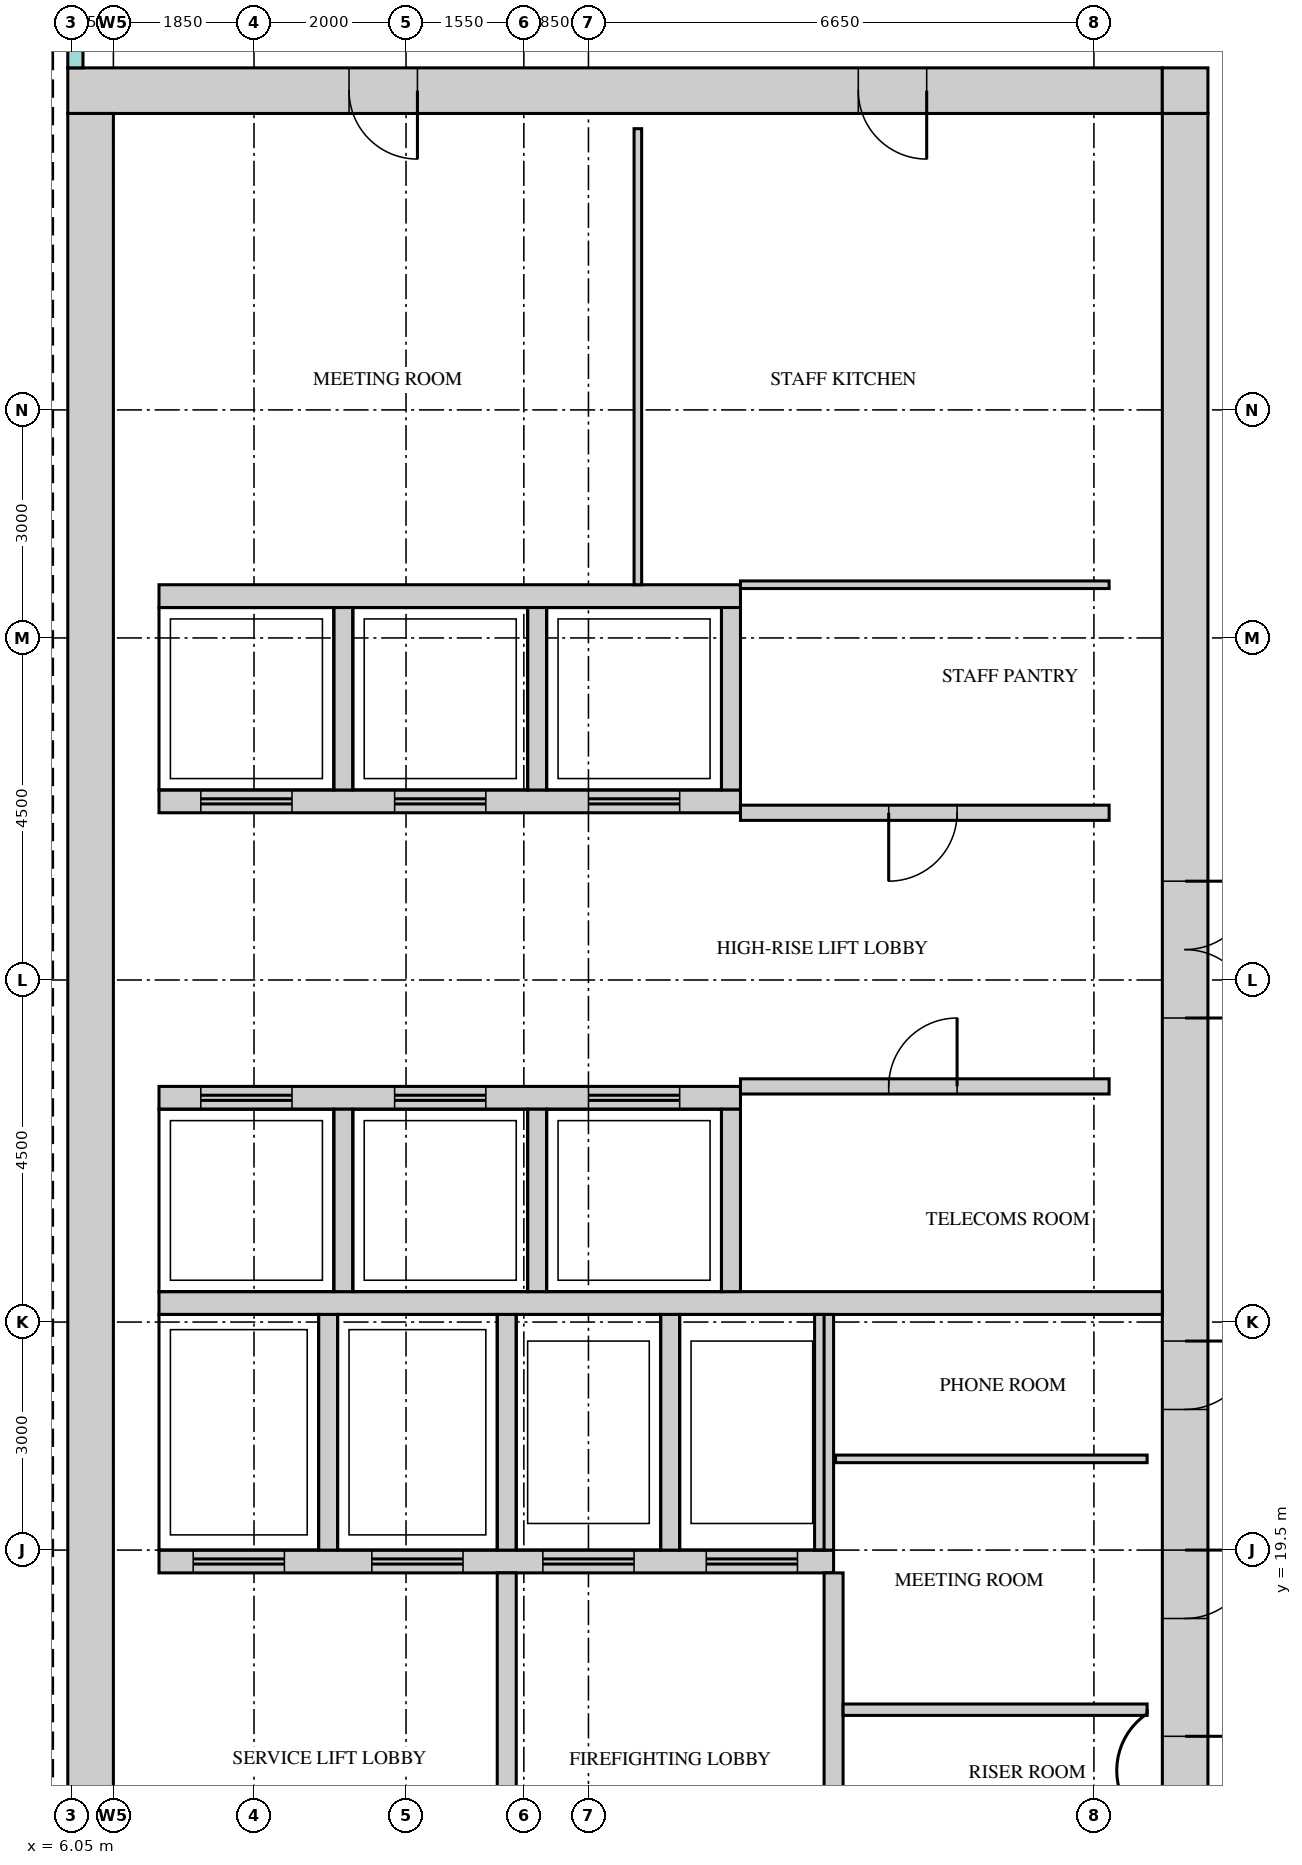
"""IFC4 building model, lengths in metres.
Left out: names, types, materials, properties, quantities, classifications, styles, units other than length and angle.
Written with IfcOpenShell. Run it as: python <this file> out.ifc"""

import sys

from ifc_helpers import new_model, si_unit, direction, frame, frame_2d, origin, place, context, subcontext, project, spatial, rectangle, extrude, source, transform, mapped, element, fill, save


model = new_model("IFC4")
c1 = context("Model", 3, precision=1e-05, world=origin(), true_north=direction((0.0, 1.0)))
c2 = subcontext(c1, "Body", "Model", "MODEL_VIEW")
j1 = project(units=[si_unit("LENGTHUNIT", "METRE"), si_unit("PLANEANGLEUNIT", "RADIAN")], contexts=[c1])
p1 = place(None, origin())
s1 = spatial("IfcSite", under=j1, at=p1, CompositionType="ELEMENT")
p2 = place(p1, origin())
s2 = spatial("IfcBuilding", under=s1, at=p2, CompositionType="ELEMENT")
p3 = place(p2, frame((0.0, 0.0, 310.2)))
s3 = spatial("IfcBuildingStorey", under=s2, at=p3, CompositionType="ELEMENT", Elevation=310.2)
m1 = source(origin(), c2, "Body", "SweptSolid", [
    extrude(rectangle(XDim=14.4, YDim=0.6, at=frame_2d((7.2, 0.0))), origin(), (0.0, 0.0, 1.0), 3.75),
])
p4 = place(p3, frame((6.0, 38.7, 0.0), z_axis=(0.0, 0.0, 1.0), x_axis=(1.0, 0.0, 0.0)))
e1 = element("IfcWall", 1, at=p4, inside=s3, PredefinedType="SHEAR", context=c2, shape_type="MappedRepresentation", body=[
    mapped(m1, transform((0.0, 0.0, 0.0))),
])
m2 = source(origin(), c2, "Body", "SweptSolid", [
    extrude(rectangle(XDim=0.9, YDim=2.1, at=frame_2d((0.45, 1.05))), frame((0.0, 0.31, 0.0), z_axis=(0.0, -1.0, 0.0), x_axis=(1.0, 0.0, 0.0)), (0.0, 0.0, 1.0), 0.62),
])
p5 = place(p4, frame((3.7, 0.0, 0.0)))
e2 = element("IfcOpeningElement", 2, at=p5, cuts=e1, PredefinedType="OPENING", context=c2, shape_type="MappedRepresentation", body=[
    mapped(m2, transform((0.0, 0.0, 0.0))),
])
p6 = place(p4, frame((10.4, 0.0, 0.0)))
e3 = element("IfcOpeningElement", 3, at=p6, cuts=e1, PredefinedType="OPENING", context=c2, shape_type="MappedRepresentation", body=[
    mapped(m2, transform((0.0, 0.0, 0.0))),
])
m3 = source(origin(), c2, "Body", "SweptSolid", [
    extrude(rectangle(XDim=0.6, YDim=0.6, at=frame_2d((0.3, 0.0))), origin(), (0.0, 0.0, 1.0), 3.75),
])
p7 = place(p3, frame((20.4, 38.7, 0.0), z_axis=(0.0, 0.0, 1.0), x_axis=(1.0, 0.0, 0.0)))
e4 = element("IfcWall", 4, at=p7, inside=s3, PredefinedType="SHEAR", context=c2, shape_type="MappedRepresentation", body=[
    mapped(m3, transform((0.0, 0.0, 0.0))),
])
m4 = source(origin(), c2, "Body", "SweptSolid", [
    extrude(rectangle(XDim=22.8, YDim=0.6, at=frame_2d((11.4, 0.0))), origin(), (0.0, 0.0, 1.0), 3.75),
])
p8 = place(p3, frame((20.7, 15.6, 0.0), z_axis=(0.0, 0.0, 1.0), x_axis=(0.0, 1.0, 0.0)))
e5 = element("IfcWall", 5, at=p8, inside=s3, PredefinedType="SHEAR", context=c2, shape_type="MappedRepresentation", body=[
    mapped(m4, transform((0.0, 0.0, 0.0))),
])
m5 = source(origin(), c2, "Body", "SweptSolid", [
    extrude(rectangle(XDim=1.8, YDim=2.1, at=frame_2d((0.9, 1.05))), frame((0.0, 0.31, 0.0), z_axis=(0.0, -1.0, 0.0), x_axis=(1.0, 0.0, 0.0)), (0.0, 0.0, 1.0), 0.62),
])
p9 = place(p8, frame((10.9, 0.0, 0.0)))
e6 = element("IfcOpeningElement", 6, at=p9, cuts=e5, PredefinedType="OPENING", context=c2, shape_type="MappedRepresentation", body=[
    mapped(m5, transform((0.0, 0.0, 0.0))),
])
p10 = place(p8, frame((0.55, 0.0, 0.0)))
e7 = element("IfcOpeningElement", 7, at=p10, cuts=e5, PredefinedType="OPENING", context=c2, shape_type="MappedRepresentation", body=[
    mapped(m2, transform((0.0, 0.0, 0.0))),
])
p11 = place(p8, frame((3.0, 0.0, 0.0)))
e8 = element("IfcOpeningElement", 8, at=p11, cuts=e5, PredefinedType="OPENING", context=c2, shape_type="MappedRepresentation", body=[
    mapped(m2, transform((0.0, 0.0, 0.0))),
])
p12 = place(p8, frame((5.75, 0.0, 0.0)))
e9 = element("IfcOpeningElement", 9, at=p12, cuts=e5, PredefinedType="OPENING", context=c2, shape_type="MappedRepresentation", body=[
    mapped(m2, transform((0.0, 0.0, 0.0))),
])
p13 = place(p3, frame((6.3, 15.6, 0.0), z_axis=(0.0, 0.0, 1.0), x_axis=(0.0, 1.0, 0.0)))
e10 = element("IfcWall", 10, at=p13, inside=s3, PredefinedType="SHEAR", context=c2, shape_type="MappedRepresentation", body=[
    mapped(m4, transform((0.0, 0.0, 0.0))),
])
m6 = source(origin(), c2, "Body", "SweptSolid", [
    extrude(rectangle(XDim=13.2, YDim=0.3, at=frame_2d((6.6, 0.0))), origin(), (0.0, 0.0, 1.0), 3.75),
])
p14 = place(p3, frame((7.2, 22.75, 0.0), z_axis=(0.0, 0.0, 1.0), x_axis=(1.0, 0.0, 0.0)))
e11 = element("IfcWall", 11, at=p14, inside=s3, PredefinedType="STANDARD", context=c2, shape_type="MappedRepresentation", body=[
    mapped(m6, transform((0.0, 0.0, 0.0))),
])
m7 = source(origin(), c2, "Body", "SweptSolid", [
    extrude(rectangle(XDim=8.875, YDim=0.3, at=frame_2d((4.438, 0.0))), origin(), (0.0, 0.0, 1.0), 3.75),
])
p15 = place(p3, frame((7.2, 19.35, 0.0), z_axis=(0.0, 0.0, 1.0), x_axis=(1.0, 0.0, 0.0)))
e12 = element("IfcWall", 12, at=p15, inside=s3, PredefinedType="STANDARD", context=c2, shape_type="MappedRepresentation", body=[
    mapped(m7, transform((0.0, 0.0, 0.0))),
])
m8 = source(origin(), c2, "Body", "SweptSolid", [
    extrude(rectangle(XDim=1.2, YDim=2.1, at=frame_2d((0.6, 1.05))), frame((0.0, 0.16, 0.0), z_axis=(0.0, -1.0, 0.0), x_axis=(1.0, 0.0, 0.0)), (0.0, 0.0, 1.0), 0.32),
])
p16 = place(p15, frame((0.45, 0.0, 0.0)))
e13 = element("IfcOpeningElement", 13, at=p16, cuts=e12, PredefinedType="OPENING", context=c2, shape_type="MappedRepresentation", body=[
    mapped(m8, transform((0.0, 0.0, 0.0))),
])
p17 = place(p15, frame((2.8, 0.0, 0.0)))
e14 = element("IfcOpeningElement", 14, at=p17, cuts=e12, PredefinedType="OPENING", context=c2, shape_type="MappedRepresentation", body=[
    mapped(m8, transform((0.0, 0.0, 0.0))),
])
p18 = place(p15, frame((5.05, 0.0, 0.0)))
e15 = element("IfcOpeningElement", 15, at=p18, cuts=e12, PredefinedType="OPENING", context=c2, shape_type="MappedRepresentation", body=[
    mapped(m8, transform((0.0, 0.0, 0.0))),
])
p19 = place(p15, frame((7.2, 0.0, 0.0)))
e16 = element("IfcOpeningElement", 16, at=p19, cuts=e12, PredefinedType="OPENING", context=c2, shape_type="MappedRepresentation", body=[
    mapped(m8, transform((0.0, 0.0, 0.0))),
])
m9 = source(origin(), c2, "Body", "SweptSolid", [
    extrude(rectangle(XDim=7.65, YDim=0.3, at=frame_2d((3.825, 0.0))), origin(), (0.0, 0.0, 1.0), 3.75),
])
p20 = place(p3, frame((7.2, 32.05, 0.0), z_axis=(0.0, 0.0, 1.0), x_axis=(1.0, 0.0, 0.0)))
e17 = element("IfcWall", 17, at=p20, inside=s3, PredefinedType="STANDARD", context=c2, shape_type="MappedRepresentation", body=[
    mapped(m9, transform((0.0, 0.0, 0.0))),
])
p21 = place(p3, frame((7.2, 29.35, 0.0), z_axis=(0.0, 0.0, 1.0), x_axis=(1.0, 0.0, 0.0)))
e18 = element("IfcWall", 18, at=p21, inside=s3, PredefinedType="STANDARD", context=c2, shape_type="MappedRepresentation", body=[
    mapped(m9, transform((0.0, 0.0, 0.0))),
])
p22 = place(p21, frame((0.55, 0.0, 0.0)))
e19 = element("IfcOpeningElement", 19, at=p22, cuts=e18, PredefinedType="OPENING", context=c2, shape_type="MappedRepresentation", body=[
    mapped(m8, transform((0.0, 0.0, 0.0))),
])
p23 = place(p21, frame((3.1, 0.0, 0.0)))
e20 = element("IfcOpeningElement", 20, at=p23, cuts=e18, PredefinedType="OPENING", context=c2, shape_type="MappedRepresentation", body=[
    mapped(m8, transform((0.0, 0.0, 0.0))),
])
p24 = place(p21, frame((5.65, 0.0, 0.0)))
e21 = element("IfcOpeningElement", 21, at=p24, cuts=e18, PredefinedType="OPENING", context=c2, shape_type="MappedRepresentation", body=[
    mapped(m8, transform((0.0, 0.0, 0.0))),
])
p25 = place(p3, frame((7.2, 25.45, 0.0), z_axis=(0.0, 0.0, 1.0), x_axis=(1.0, 0.0, 0.0)))
e22 = element("IfcWall", 22, at=p25, inside=s3, PredefinedType="STANDARD", context=c2, shape_type="MappedRepresentation", body=[
    mapped(m9, transform((0.0, 0.0, 0.0))),
])
p26 = place(p25, frame((0.55, 0.0, 0.0)))
e23 = element("IfcOpeningElement", 23, at=p26, cuts=e22, PredefinedType="OPENING", context=c2, shape_type="MappedRepresentation", body=[
    mapped(m8, transform((0.0, 0.0, 0.0))),
])
p27 = place(p25, frame((3.1, 0.0, 0.0)))
e24 = element("IfcOpeningElement", 24, at=p27, cuts=e22, PredefinedType="OPENING", context=c2, shape_type="MappedRepresentation", body=[
    mapped(m8, transform((0.0, 0.0, 0.0))),
])
p28 = place(p25, frame((5.65, 0.0, 0.0)))
e25 = element("IfcOpeningElement", 25, at=p28, cuts=e22, PredefinedType="OPENING", context=c2, shape_type="MappedRepresentation", body=[
    mapped(m8, transform((0.0, 0.0, 0.0))),
])
m10 = source(origin(), c2, "Body", "SweptSolid", [
    extrude(rectangle(XDim=3.1, YDim=0.25, at=frame_2d((1.55, 0.0))), origin(), (0.0, 0.0, 1.0), 3.75),
])
for number, where, z_axis, x_axis in (
    (26, (9.425, 19.5, 0.0), (0.0, 0.0, 1.0), (0.0, 1.0, 0.0)),
    (27, (11.775, 19.5, 0.0), (0.0, 0.0, 1.0), (0.0, 1.0, 0.0)),
    (28, (13.925, 19.5, 0.0), (0.0, 0.0, 1.0), (0.0, 1.0, 0.0)),
    (29, (15.95, 19.5, 0.0), (0.0, 0.0, 1.0), (0.0, 1.0, 0.0)),
):
    element("IfcWall", number, at=place(p3, frame(where, z_axis=z_axis, x_axis=x_axis)), inside=s3, PredefinedType="STANDARD", context=c2, shape_type="MappedRepresentation", body=[
        mapped(m10, transform((0.0, 0.0, 0.0))),
    ])
m11 = source(origin(), c2, "Body", "SweptSolid", [
    extrude(rectangle(XDim=2.4, YDim=0.25, at=frame_2d((1.2, 0.0))), origin(), (0.0, 0.0, 1.0), 3.75),
])
for number, where, z_axis, x_axis in (
    (30, (9.625, 29.5, 0.0), (0.0, 0.0, 1.0), (0.0, 1.0, 0.0)),
    (31, (12.175, 29.5, 0.0), (0.0, 0.0, 1.0), (0.0, 1.0, 0.0)),
    (32, (14.725, 29.5, 0.0), (0.0, 0.0, 1.0), (0.0, 1.0, 0.0)),
):
    element("IfcWall", number, at=place(p3, frame(where, z_axis=z_axis, x_axis=x_axis)), inside=s3, PredefinedType="STANDARD", context=c2, shape_type="MappedRepresentation", body=[
        mapped(m11, transform((0.0, 0.0, 0.0))),
    ])
m12 = source(origin(), c2, "Body", "SweptSolid", [
    extrude(rectangle(XDim=2.4, YDim=0.25, at=frame_2d((1.2, 0.0))), origin(), (0.0, 0.0, 1.0), 3.75),
])
for number, where, z_axis, x_axis in (
    (33, (9.625, 22.9, 0.0), (0.0, 0.0, 1.0), (0.0, 1.0, 0.0)),
    (34, (12.175, 22.9, 0.0), (0.0, 0.0, 1.0), (0.0, 1.0, 0.0)),
    (35, (14.725, 22.9, 0.0), (0.0, 0.0, 1.0), (0.0, 1.0, 0.0)),
):
    element("IfcWall", number, at=place(p3, frame(where, z_axis=z_axis, x_axis=x_axis)), inside=s3, PredefinedType="STANDARD", context=c2, shape_type="MappedRepresentation", body=[
        mapped(m12, transform((0.0, 0.0, 0.0))),
    ])
m13 = source(origin(), c2, "Body", "SweptSolid", [
    extrude(rectangle(XDim=3.6, YDim=0.25, at=frame_2d((1.8, 0.0))), origin(), (0.0, 0.0, 1.0), 3.75),
])
for number, where, z_axis, x_axis in (
    (36, (16.075, 15.6, 0.0), (0.0, 0.0, 1.0), (0.0, 1.0, 0.0)),
    (37, (11.775, 15.6, 0.0), (0.0, 0.0, 1.0), (0.0, 1.0, 0.0)),
):
    element("IfcWall", number, at=place(p3, frame(where, z_axis=z_axis, x_axis=x_axis)), inside=s3, PredefinedType="STANDARD", context=c2, shape_type="MappedRepresentation", body=[
        mapped(m13, transform((0.0, 0.0, 0.0))),
    ])
m14 = source(origin(), c2, "Body", "SweptSolid", [
    extrude(rectangle(XDim=4.0, YDim=0.15, at=frame_2d((2.0, 0.0))), origin(), (0.0, 0.0, 1.0), 3.8),
])
p29 = place(p3, frame((16.2, 17.4, 0.0), z_axis=(0.0, 0.0, 1.0), x_axis=(1.0, 0.0, 0.0)))
e38 = element("IfcWall", 38, at=p29, inside=s3, PredefinedType="PARTITIONING", context=c2, shape_type="MappedRepresentation", body=[
    mapped(m14, transform((0.0, 0.0, 0.0))),
])
m15 = source(origin(), c2, "Body", "SweptSolid", [
    extrude(rectangle(XDim=4.1, YDim=0.1, at=frame_2d((2.05, 0.0))), origin(), (0.0, 0.0, 1.0), 3.8),
])
p30 = place(p3, frame((16.1, 20.7, 0.0), z_axis=(0.0, 0.0, 1.0), x_axis=(1.0, 0.0, 0.0)))
e39 = element("IfcWall", 39, at=p30, inside=s3, PredefinedType="PARTITIONING", context=c2, shape_type="MappedRepresentation", body=[
    mapped(m15, transform((0.0, 0.0, 0.0))),
])
m16 = source(origin(), c2, "Body", "SweptSolid", [
    extrude(rectangle(XDim=4.85, YDim=0.2, at=frame_2d((2.425, 0.0))), origin(), (0.0, 0.0, 1.0), 3.8),
])
p31 = place(p3, frame((14.85, 25.6, 0.0), z_axis=(0.0, 0.0, 1.0), x_axis=(1.0, 0.0, 0.0)))
e40 = element("IfcWall", 40, at=p31, inside=s3, PredefinedType="PARTITIONING", context=c2, shape_type="MappedRepresentation", body=[
    mapped(m16, transform((0.0, 0.0, 0.0))),
])
m17 = source(origin(), c2, "Body", "SweptSolid", [
    extrude(rectangle(XDim=0.9, YDim=2.1, at=frame_2d((0.45, 1.05))), frame((0.0, 0.11, 0.0), z_axis=(0.0, -1.0, 0.0), x_axis=(1.0, 0.0, 0.0)), (0.0, 0.0, 1.0), 0.22),
])
p32 = place(p31, frame((1.95, 0.0, 0.0)))
e41 = element("IfcOpeningElement", 41, at=p32, cuts=e40, PredefinedType="OPENING", context=c2, shape_type="MappedRepresentation", body=[
    mapped(m17, transform((0.0, 0.0, 0.0))),
])
p33 = place(p3, frame((14.85, 29.2, 0.0), z_axis=(0.0, 0.0, 1.0), x_axis=(1.0, 0.0, 0.0)))
e42 = element("IfcWall", 42, at=p33, inside=s3, PredefinedType="PARTITIONING", context=c2, shape_type="MappedRepresentation", body=[
    mapped(m16, transform((0.0, 0.0, 0.0))),
])
p34 = place(p33, frame((1.95, 0.0, 0.0)))
e43 = element("IfcOpeningElement", 43, at=p34, cuts=e42, PredefinedType="OPENING", context=c2, shape_type="MappedRepresentation", body=[
    mapped(m17, transform((0.0, 0.0, 0.0))),
])
m18 = source(origin(), c2, "Body", "SweptSolid", [
    extrude(rectangle(XDim=6.0, YDim=0.1, at=frame_2d((3.0, 0.0))), origin(), (0.0, 0.0, 1.0), 3.8),
])
p35 = place(p3, frame((13.5, 32.2, 0.0), z_axis=(0.0, 0.0, 1.0), x_axis=(0.0, 1.0, 0.0)))
e44 = element("IfcWall", 44, at=p35, inside=s3, PredefinedType="PARTITIONING", context=c2, shape_type="MappedRepresentation", body=[
    mapped(m18, transform((0.0, 0.0, 0.0))),
])
m19 = source(origin(), c2, "Body", "SweptSolid", [
    extrude(rectangle(XDim=4.85, YDim=0.1, at=frame_2d((2.425, 0.0))), origin(), (0.0, 0.0, 1.0), 3.8),
])
p36 = place(p3, frame((14.85, 32.2, 0.0), z_axis=(0.0, 0.0, 1.0), x_axis=(1.0, 0.0, 0.0)))
e45 = element("IfcWall", 45, at=p36, inside=s3, PredefinedType="PARTITIONING", context=c2, shape_type="MappedRepresentation", body=[
    mapped(m19, transform((0.0, 0.0, 0.0))),
])
m20 = source(origin(), c2, "Body", "SweptSolid", [
    extrude(rectangle(XDim=0.9, YDim=2.1, at=frame_2d((0.45, 1.05))), frame((0.0, 0.025, 0.0), z_axis=(0.0, -1.0, 0.0), x_axis=(1.0, 0.0, 0.0)), (0.0, 0.0, 1.0), 0.05),
])
p37 = place(p32, origin())
e46 = element("IfcDoor", 46, at=p37, inside=s3, OperationType="SINGLE_SWING_LEFT", PredefinedType="DOOR", context=c2, shape_type="MappedRepresentation", body=[
    mapped(m20, transform((0.0, 0.0, 0.0))),
])
fill(e41, e46)
p38 = place(p34, origin())
e47 = element("IfcDoor", 47, at=p38, inside=s3, OperationType="SINGLE_SWING_LEFT", PredefinedType="DOOR", context=c2, shape_type="MappedRepresentation", body=[
    mapped(m20, transform((0.0, 0.0, 0.0))),
])
fill(e43, e47)
m21 = source(origin(), c2, "Body", "SweptSolid", [
    extrude(rectangle(XDim=1.8, YDim=2.1, at=frame_2d((0.9, 1.05))), frame((0.0, 0.25, 0.0), z_axis=(0.0, -1.0, 0.0), x_axis=(1.0, 0.0, 0.0)), (0.0, 0.0, 1.0), 0.5),
])
p39 = place(p9, origin())
e48 = element("IfcDoor", 48, at=p39, inside=s3, OperationType="DOUBLE_DOOR_SINGLE_SWING", PredefinedType="DOOR", context=c2, shape_type="MappedRepresentation", body=[
    mapped(m21, transform((0.0, 0.0, 0.0))),
])
fill(e6, e48)
m22 = source(origin(), c2, "Body", "SweptSolid", [
    extrude(rectangle(XDim=0.9, YDim=2.1, at=frame_2d((0.45, 1.05))), frame((0.0, 0.25, 0.0), z_axis=(0.0, -1.0, 0.0), x_axis=(1.0, 0.0, 0.0)), (0.0, 0.0, 1.0), 0.5),
])
p40 = place(p5, origin())
e49 = element("IfcDoor", 49, at=p40, inside=s3, OperationType="SINGLE_SWING_RIGHT", PredefinedType="DOOR", context=c2, shape_type="MappedRepresentation", body=[
    mapped(m22, transform((0.0, 0.0, 0.0))),
])
fill(e2, e49)
p41 = place(p6, origin())
e50 = element("IfcDoor", 50, at=p41, inside=s3, OperationType="SINGLE_SWING_RIGHT", PredefinedType="DOOR", context=c2, shape_type="MappedRepresentation", body=[
    mapped(m22, transform((0.0, 0.0, 0.0))),
])
fill(e3, e50)
p42 = place(p10, origin())
e51 = element("IfcDoor", 51, at=p42, inside=s3, OperationType="SINGLE_SWING_RIGHT", PredefinedType="DOOR", context=c2, shape_type="MappedRepresentation", body=[
    mapped(m22, transform((0.0, 0.0, 0.0))),
])
fill(e7, e51)
p43 = place(p11, origin())
e52 = element("IfcDoor", 52, at=p43, inside=s3, OperationType="SINGLE_SWING_RIGHT", PredefinedType="DOOR", context=c2, shape_type="MappedRepresentation", body=[
    mapped(m22, transform((0.0, 0.0, 0.0))),
])
fill(e8, e52)
p44 = place(p12, origin())
e53 = element("IfcDoor", 53, at=p44, inside=s3, OperationType="SINGLE_SWING_RIGHT", PredefinedType="DOOR", context=c2, shape_type="MappedRepresentation", body=[
    mapped(m22, transform((0.0, 0.0, 0.0))),
])
fill(e9, e53)
m23 = source(origin(), c2, "Body", "SweptSolid", [
    extrude(rectangle(XDim=1.2, YDim=2.1, at=frame_2d((0.6, 1.05))), frame((0.0, 0.025, 0.0), z_axis=(0.0, -1.0, 0.0), x_axis=(1.0, 0.0, 0.0)), (0.0, 0.0, 1.0), 0.05),
])
p45 = place(p26, origin())
e54 = element("IfcDoor", 54, at=p45, inside=s3, OperationType="DOUBLE_DOOR_SLIDING", PredefinedType="DOOR", context=c2, shape_type="MappedRepresentation", body=[
    mapped(m23, transform((0.0, 0.0, 0.0))),
])
fill(e23, e54)
p46 = place(p27, origin())
e55 = element("IfcDoor", 55, at=p46, inside=s3, OperationType="DOUBLE_DOOR_SLIDING", PredefinedType="DOOR", context=c2, shape_type="MappedRepresentation", body=[
    mapped(m23, transform((0.0, 0.0, 0.0))),
])
fill(e24, e55)
p47 = place(p28, origin())
e56 = element("IfcDoor", 56, at=p47, inside=s3, OperationType="DOUBLE_DOOR_SLIDING", PredefinedType="DOOR", context=c2, shape_type="MappedRepresentation", body=[
    mapped(m23, transform((0.0, 0.0, 0.0))),
])
fill(e25, e56)
p48 = place(p22, origin())
e57 = element("IfcDoor", 57, at=p48, inside=s3, OperationType="DOUBLE_DOOR_SLIDING", PredefinedType="DOOR", context=c2, shape_type="MappedRepresentation", body=[
    mapped(m23, transform((0.0, 0.0, 0.0))),
])
fill(e19, e57)
p49 = place(p23, origin())
e58 = element("IfcDoor", 58, at=p49, inside=s3, OperationType="DOUBLE_DOOR_SLIDING", PredefinedType="DOOR", context=c2, shape_type="MappedRepresentation", body=[
    mapped(m23, transform((0.0, 0.0, 0.0))),
])
fill(e20, e58)
p50 = place(p24, origin())
e59 = element("IfcDoor", 59, at=p50, inside=s3, OperationType="DOUBLE_DOOR_SLIDING", PredefinedType="DOOR", context=c2, shape_type="MappedRepresentation", body=[
    mapped(m23, transform((0.0, 0.0, 0.0))),
])
fill(e21, e59)
p51 = place(p16, origin())
e60 = element("IfcDoor", 60, at=p51, inside=s3, OperationType="DOUBLE_DOOR_SLIDING", PredefinedType="DOOR", context=c2, shape_type="MappedRepresentation", body=[
    mapped(m23, transform((0.0, 0.0, 0.0))),
])
fill(e13, e60)
p52 = place(p17, origin())
e61 = element("IfcDoor", 61, at=p52, inside=s3, OperationType="DOUBLE_DOOR_SLIDING", PredefinedType="DOOR", context=c2, shape_type="MappedRepresentation", body=[
    mapped(m23, transform((0.0, 0.0, 0.0))),
])
fill(e14, e61)
p53 = place(p18, origin())
e62 = element("IfcDoor", 62, at=p53, inside=s3, OperationType="DOUBLE_DOOR_SLIDING", PredefinedType="DOOR", context=c2, shape_type="MappedRepresentation", body=[
    mapped(m23, transform((0.0, 0.0, 0.0))),
])
fill(e15, e62)
p54 = place(p19, origin())
e63 = element("IfcDoor", 63, at=p54, inside=s3, OperationType="DOUBLE_DOOR_SLIDING", PredefinedType="DOOR", context=c2, shape_type="MappedRepresentation", body=[
    mapped(m23, transform((0.0, 0.0, 0.0))),
])
fill(e16, e63)
save(model, sys.argv[1])
